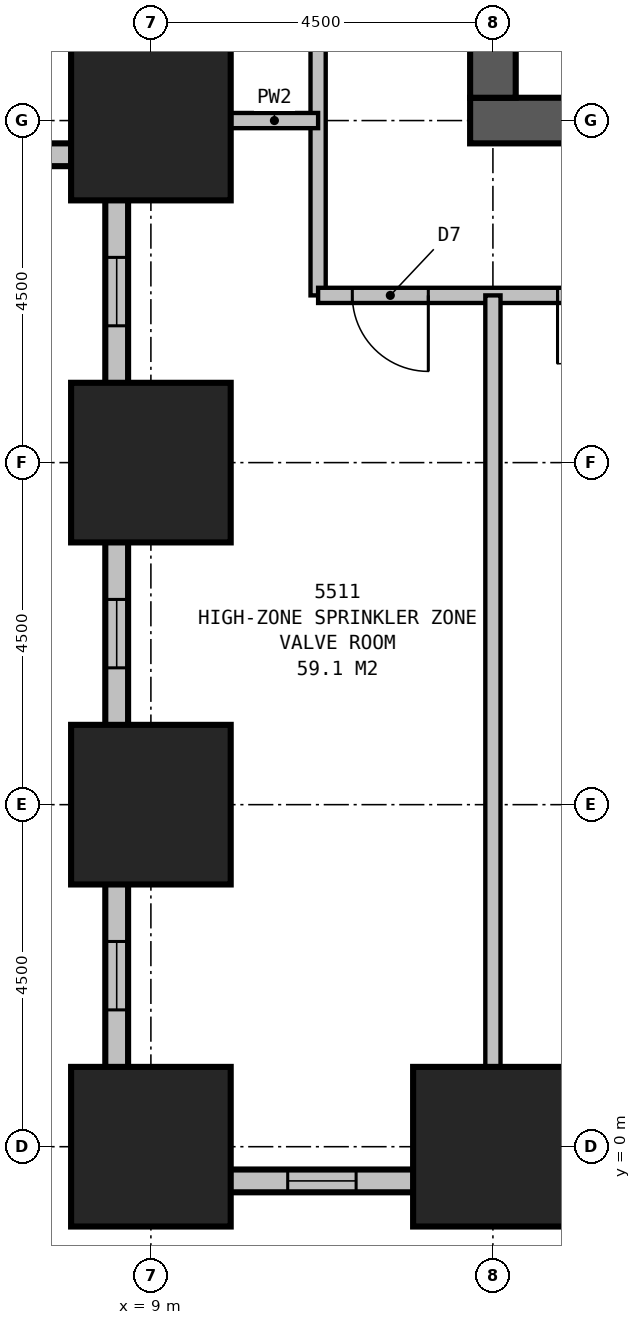
"""IFC4 building model, lengths in metres.
Left out: names, types, materials, properties, quantities, classifications, styles, units other than length and angle.
Written with IfcOpenShell. Run it as: python <this file> out.ifc"""

import sys

from ifc_helpers import new_model, si_unit, direction, frame, frame_2d, origin, origin_2d, place, context, subcontext, project, spatial, rectangle, extrude, element, fill, save


model = new_model("IFC4")
c1 = context("Model", 3, precision=1e-05, world=origin(), true_north=direction((0.0, 1.0)))
c2 = subcontext(c1, "Body", "Model", "MODEL_VIEW")
j1 = project(units=[si_unit("LENGTHUNIT", "METRE"), si_unit("PLANEANGLEUNIT", "RADIAN")], contexts=[c1])
p1 = place(None, origin())
s1 = spatial("IfcSite", under=j1, at=p1, CompositionType="ELEMENT")
p2 = place(p1, origin())
s2 = spatial("IfcBuilding", under=s1, at=p2, CompositionType="ELEMENT")
p3 = place(p2, frame((0.0, 0.0, 211.4)))
s3 = spatial("IfcBuildingStorey", under=s2, at=p3, CompositionType="ELEMENT", Elevation=211.4)
for number, where, z_axis, x_axis in (
    (1, (9.0, 13.5, 0.0), (0.0, 0.0, 1.0), (1.0, 0.0, 0.0)),
    (2, (9.0, 9.0, 0.0), (0.0, 0.0, 1.0), (1.0, 0.0, 0.0)),
    (3, (9.0, 4.5, 0.0), (0.0, 0.0, 1.0), (1.0, 0.0, 0.0)),
    (4, (9.0, 0.0, 0.0), (0.0, 0.0, 1.0), (1.0, 0.0, 0.0)),
    (5, (13.5, 0.0, 0.0), (0.0, 0.0, 1.0), (1.0, 0.0, 0.0)),
):
    element("IfcColumn", number, at=place(p3, frame(where, z_axis=z_axis, x_axis=x_axis)), inside=s3, PredefinedType="COLUMN", context=c2, shape_type="SweptSolid", body=[
        extrude(rectangle(XDim=2.1, YDim=2.1, at=origin_2d()), origin(), (0.0, 0.0, 1.0), 6.0),
    ])
p4 = place(p3, frame((13.2, 13.5, 0.0), z_axis=(0.0, 0.0, 1.0), x_axis=(1.0, 0.0, 0.0)))
e6 = element("IfcWall", 6, at=p4, inside=s3, PredefinedType="SHEAR", context=c2, shape_type="SweptSolid", body=[
    extrude(rectangle(XDim=23.1, YDim=0.6, at=frame_2d((11.55, 0.0))), origin(), (0.0, 0.0, 1.0), 6.0),
])
p5 = place(p3, frame((13.5, 16.5, 0.0), z_axis=(0.0, 0.0, 1.0), x_axis=(0.0, -1.0, 0.0)))
e7 = element("IfcWall", 7, at=p5, inside=s3, PredefinedType="SHEAR", context=c2, shape_type="SweptSolid", body=[
    extrude(rectangle(XDim=2.7, YDim=0.6, at=frame_2d((1.35, 0.0))), origin(), (0.0, 0.0, 1.0), 6.0),
])
p6 = place(p3, frame((0.847, 13.05, 0.0), z_axis=(0.0, 0.0, 1.0), x_axis=(1.0, 0.0, 0.0)))
e8 = element("IfcWall", 8, at=p6, inside=s3, PredefinedType="STANDARD", context=c2, shape_type="SweptSolid", body=[
    extrude(rectangle(XDim=7.853, YDim=0.3, at=frame_2d((3.926, 0.0))), origin(), (0.0, 0.0, 1.0), 2.15),
])
p7 = place(p6, frame((5.453, 0.0, 0.5)))
e9 = element("IfcOpeningElement", 9, at=p7, cuts=e8, PredefinedType="OPENING", context=c2, shape_type="SweptSolid", body=[
    extrude(rectangle(XDim=0.9, YDim=1.2, at=frame_2d((0.45, 0.6))), frame((0.0, 0.16, 0.0), z_axis=(0.0, -1.0, 0.0), x_axis=(1.0, 0.0, 0.0)), (0.0, 0.0, 1.0), 0.32),
])
p8 = place(p3, frame((8.55, 13.2, 0.0), z_axis=(0.0, 0.0, 1.0), x_axis=(0.0, -1.0, 0.0)))
e10 = element("IfcWall", 10, at=p8, inside=s3, PredefinedType="STANDARD", context=c2, shape_type="SweptSolid", body=[
    extrude(rectangle(XDim=13.8, YDim=0.3, at=frame_2d((6.9, 0.0))), origin(), (0.0, 0.0, 1.0), 4.6),
])
p9 = place(p8, frame((1.5, 0.0, 0.5)))
e11 = element("IfcOpeningElement", 11, at=p9, cuts=e10, PredefinedType="OPENING", context=c2, shape_type="SweptSolid", body=[
    extrude(rectangle(XDim=0.9, YDim=1.2, at=frame_2d((0.45, 0.6))), frame((0.0, 0.16, 0.0), z_axis=(0.0, -1.0, 0.0), x_axis=(1.0, 0.0, 0.0)), (0.0, 0.0, 1.0), 0.32),
])
p10 = place(p8, frame((6.0, 0.0, 0.5)))
e12 = element("IfcOpeningElement", 12, at=p10, cuts=e10, PredefinedType="OPENING", context=c2, shape_type="SweptSolid", body=[
    extrude(rectangle(XDim=0.9, YDim=1.2, at=frame_2d((0.45, 0.6))), frame((0.0, 0.16, 0.0), z_axis=(0.0, -1.0, 0.0), x_axis=(1.0, 0.0, 0.0)), (0.0, 0.0, 1.0), 0.32),
])
p11 = place(p8, frame((10.5, 0.0, 0.5)))
e13 = element("IfcOpeningElement", 13, at=p11, cuts=e10, PredefinedType="OPENING", context=c2, shape_type="SweptSolid", body=[
    extrude(rectangle(XDim=0.9, YDim=1.2, at=frame_2d((0.45, 0.6))), frame((0.0, 0.16, 0.0), z_axis=(0.0, -1.0, 0.0), x_axis=(1.0, 0.0, 0.0)), (0.0, 0.0, 1.0), 0.32),
])
p12 = place(p3, frame((8.4, -0.45, 0.0), z_axis=(0.0, 0.0, 1.0), x_axis=(1.0, 0.0, 0.0)))
e14 = element("IfcWall", 14, at=p12, inside=s3, PredefinedType="STANDARD", context=c2, shape_type="SweptSolid", body=[
    extrude(rectangle(XDim=37.2, YDim=0.3, at=frame_2d((18.6, 0.0))), origin(), (0.0, 0.0, 1.0), 4.6),
])
p13 = place(p12, frame((2.4, 0.0, 0.5)))
e15 = element("IfcOpeningElement", 15, at=p13, cuts=e14, PredefinedType="OPENING", context=c2, shape_type="SweptSolid", body=[
    extrude(rectangle(XDim=0.9, YDim=1.2, at=frame_2d((0.45, 0.6))), frame((0.0, 0.16, 0.0), z_axis=(0.0, -1.0, 0.0), x_axis=(1.0, 0.0, 0.0)), (0.0, 0.0, 1.0), 0.32),
])
p14 = place(p12, frame((6.9, 0.0, 0.5)))
e16 = element("IfcOpeningElement", 16, at=p14, cuts=e14, PredefinedType="OPENING", context=c2, shape_type="SweptSolid", body=[
    extrude(rectangle(XDim=0.9, YDim=1.2, at=frame_2d((0.45, 0.6))), frame((0.0, 0.16, 0.0), z_axis=(0.0, -1.0, 0.0), x_axis=(1.0, 0.0, 0.0)), (0.0, 0.0, 1.0), 0.32),
])
p15 = place(p12, frame((11.4, 0.0, 0.5)))
e17 = element("IfcOpeningElement", 17, at=p15, cuts=e14, PredefinedType="OPENING", context=c2, shape_type="SweptSolid", body=[
    extrude(rectangle(XDim=0.9, YDim=1.2, at=frame_2d((0.45, 0.6))), frame((0.0, 0.16, 0.0), z_axis=(0.0, -1.0, 0.0), x_axis=(1.0, 0.0, 0.0)), (0.0, 0.0, 1.0), 0.32),
])
p16 = place(p12, frame((15.9, 0.0, 0.5)))
e18 = element("IfcOpeningElement", 18, at=p16, cuts=e14, PredefinedType="OPENING", context=c2, shape_type="SweptSolid", body=[
    extrude(rectangle(XDim=0.9, YDim=1.2, at=frame_2d((0.45, 0.6))), frame((0.0, 0.16, 0.0), z_axis=(0.0, -1.0, 0.0), x_axis=(1.0, 0.0, 0.0)), (0.0, 0.0, 1.0), 0.32),
])
p17 = place(p12, frame((20.4, 0.0, 0.5)))
e19 = element("IfcOpeningElement", 19, at=p17, cuts=e14, PredefinedType="OPENING", context=c2, shape_type="SweptSolid", body=[
    extrude(rectangle(XDim=0.9, YDim=1.2, at=frame_2d((0.45, 0.6))), frame((0.0, 0.16, 0.0), z_axis=(0.0, -1.0, 0.0), x_axis=(1.0, 0.0, 0.0)), (0.0, 0.0, 1.0), 0.32),
])
p18 = place(p12, frame((24.9, 0.0, 0.5)))
e20 = element("IfcOpeningElement", 20, at=p18, cuts=e14, PredefinedType="OPENING", context=c2, shape_type="SweptSolid", body=[
    extrude(rectangle(XDim=0.9, YDim=1.2, at=frame_2d((0.45, 0.6))), frame((0.0, 0.16, 0.0), z_axis=(0.0, -1.0, 0.0), x_axis=(1.0, 0.0, 0.0)), (0.0, 0.0, 1.0), 0.32),
])
p19 = place(p12, frame((29.4, 0.0, 0.5)))
e21 = element("IfcOpeningElement", 21, at=p19, cuts=e14, PredefinedType="OPENING", context=c2, shape_type="SweptSolid", body=[
    extrude(rectangle(XDim=0.9, YDim=1.2, at=frame_2d((0.45, 0.6))), frame((0.0, 0.16, 0.0), z_axis=(0.0, -1.0, 0.0), x_axis=(1.0, 0.0, 0.0)), (0.0, 0.0, 1.0), 0.32),
])
p20 = place(p12, frame((33.9, 0.0, 0.5)))
e22 = element("IfcOpeningElement", 22, at=p20, cuts=e14, PredefinedType="OPENING", context=c2, shape_type="SweptSolid", body=[
    extrude(rectangle(XDim=0.9, YDim=1.2, at=frame_2d((0.45, 0.6))), frame((0.0, 0.16, 0.0), z_axis=(0.0, -1.0, 0.0), x_axis=(1.0, 0.0, 0.0)), (0.0, 0.0, 1.0), 0.32),
])
p21 = place(p3, frame((11.2, 11.2, 0.0), z_axis=(0.0, 0.0, 1.0), x_axis=(1.0, 0.0, 0.0)))
e23 = element("IfcWall", 23, at=p21, inside=s3, PredefinedType="PARTITIONING", context=c2, shape_type="SweptSolid", body=[
    extrude(rectangle(XDim=27.1, YDim=0.2, at=frame_2d((13.55, 0.0))), origin(), (0.0, 0.0, 1.0), 5.75),
])
p22 = place(p21, frame((4.95, 0.0, 0.0), z_axis=(0.0, 0.0, 1.0), x_axis=(-1.0, 0.0, 0.0)))
e24 = element("IfcOpeningElement", 24, at=p22, cuts=e23, PredefinedType="OPENING", context=c2, shape_type="SweptSolid", body=[
    extrude(rectangle(XDim=1.8, YDim=2.4, at=frame_2d((0.9, 1.2))), frame((0.0, 0.11, 0.0), z_axis=(0.0, -1.0, 0.0), x_axis=(1.0, 0.0, 0.0)), (0.0, 0.0, 1.0), 0.22),
])
p23 = place(p21, frame((17.5, 0.0, 0.0), z_axis=(0.0, 0.0, 1.0), x_axis=(-1.0, 0.0, 0.0)))
e25 = element("IfcOpeningElement", 25, at=p23, cuts=e23, PredefinedType="OPENING", context=c2, shape_type="SweptSolid", body=[
    extrude(rectangle(XDim=1.0, YDim=2.1, at=frame_2d((0.5, 1.05))), frame((0.0, 0.11, 0.0), z_axis=(0.0, -1.0, 0.0), x_axis=(1.0, 0.0, 0.0)), (0.0, 0.0, 1.0), 0.22),
])
p24 = place(p21, frame((19.6, 0.0, 0.0), z_axis=(0.0, 0.0, 1.0), x_axis=(-1.0, 0.0, 0.0)))
e26 = element("IfcOpeningElement", 26, at=p24, cuts=e23, PredefinedType="OPENING", context=c2, shape_type="SweptSolid", body=[
    extrude(rectangle(XDim=1.0, YDim=2.1, at=frame_2d((0.5, 1.05))), frame((0.0, 0.11, 0.0), z_axis=(0.0, -1.0, 0.0), x_axis=(1.0, 0.0, 0.0)), (0.0, 0.0, 1.0), 0.22),
])
p25 = place(p21, frame((21.75, 0.0, 0.0), z_axis=(0.0, 0.0, 1.0), x_axis=(-1.0, 0.0, 0.0)))
e27 = element("IfcOpeningElement", 27, at=p25, cuts=e23, PredefinedType="OPENING", context=c2, shape_type="SweptSolid", body=[
    extrude(rectangle(XDim=1.0, YDim=2.1, at=frame_2d((0.5, 1.05))), frame((0.0, 0.11, 0.0), z_axis=(0.0, -1.0, 0.0), x_axis=(1.0, 0.0, 0.0)), (0.0, 0.0, 1.0), 0.22),
])
p26 = place(p21, frame((1.45, 0.0, 0.0), z_axis=(0.0, 0.0, 1.0), x_axis=(-1.0, 0.0, 0.0)))
e28 = element("IfcOpeningElement", 28, at=p26, cuts=e23, PredefinedType="OPENING", context=c2, shape_type="SweptSolid", body=[
    extrude(rectangle(XDim=1.0, YDim=2.1, at=frame_2d((0.5, 1.05))), frame((0.0, 0.11, 0.0), z_axis=(0.0, -1.0, 0.0), x_axis=(1.0, 0.0, 0.0)), (0.0, 0.0, 1.0), 0.22),
])
p27 = place(p21, frame((26.55, 0.0, 0.0), z_axis=(0.0, 0.0, 1.0), x_axis=(-1.0, 0.0, 0.0)))
e29 = element("IfcOpeningElement", 29, at=p27, cuts=e23, PredefinedType="OPENING", context=c2, shape_type="SweptSolid", body=[
    extrude(rectangle(XDim=1.2, YDim=2.1, at=frame_2d((0.6, 1.05))), frame((0.0, 0.11, 0.0), z_axis=(0.0, -1.0, 0.0), x_axis=(1.0, 0.0, 0.0)), (0.0, 0.0, 1.0), 0.22),
])
p28 = place(p3, frame((11.2, 11.2, 0.0), z_axis=(0.0, 0.0, 1.0), x_axis=(0.0, 1.0, 0.0)))
e30 = element("IfcWall", 30, at=p28, inside=s3, PredefinedType="PARTITIONING", context=c2, shape_type="SweptSolid", body=[
    extrude(rectangle(XDim=18.1, YDim=0.2, at=frame_2d((9.05, 0.0))), origin(), (0.0, 0.0, 1.0), 5.75),
])
p29 = place(p28, frame((3.35, 0.0, 0.0)))
e31 = element("IfcOpeningElement", 31, at=p29, cuts=e30, PredefinedType="OPENING", context=c2, shape_type="SweptSolid", body=[
    extrude(rectangle(XDim=1.0, YDim=2.1, at=frame_2d((0.5, 1.05))), frame((0.0, 0.11, 0.0), z_axis=(0.0, -1.0, 0.0), x_axis=(1.0, 0.0, 0.0)), (0.0, 0.0, 1.0), 0.22),
])
p30 = place(p28, frame((7.25, 0.0, 0.0)))
e32 = element("IfcOpeningElement", 32, at=p30, cuts=e30, PredefinedType="OPENING", context=c2, shape_type="SweptSolid", body=[
    extrude(rectangle(XDim=1.2, YDim=2.1, at=frame_2d((0.6, 1.05))), frame((0.0, 0.11, 0.0), z_axis=(0.0, -1.0, 0.0), x_axis=(1.0, 0.0, 0.0)), (0.0, 0.0, 1.0), 0.22),
])
p31 = place(p3, frame((13.5, 11.2, 0.0), z_axis=(0.0, 0.0, 1.0), x_axis=(0.0, -1.0, 0.0)))
e33 = element("IfcWall", 33, at=p31, inside=s3, PredefinedType="PARTITIONING", context=c2, shape_type="SweptSolid", body=[
    extrude(rectangle(XDim=10.15, YDim=0.2, at=frame_2d((5.075, 0.0))), origin(), (0.0, 0.0, 1.0), 1.85),
])
p32 = place(p3, frame((11.2, 13.5, 0.0), z_axis=(0.0, 0.0, 1.0), x_axis=(-1.0, 0.0, 0.0)))
e34 = element("IfcWall", 34, at=p32, inside=s3, PredefinedType="PARTITIONING", context=c2, shape_type="SweptSolid", body=[
    extrude(rectangle(XDim=1.15, YDim=0.2, at=frame_2d((0.575, 0.0))), origin(), (0.0, 0.0, 1.0), 2.15),
])
p33 = place(p9, origin())
e35 = element("IfcWindow", 35, at=p33, inside=s3, PartitioningType="SINGLE_PANEL", PredefinedType="USERDEFINED", context=c2, shape_type="SweptSolid", body=[
    extrude(rectangle(XDim=0.9, YDim=1.2, at=frame_2d((0.45, 0.6))), frame((0.0, 0.03, 0.0), z_axis=(0.0, -1.0, 0.0), x_axis=(1.0, 0.0, 0.0)), (0.0, 0.0, 1.0), 0.06),
])
fill(e11, e35)
p34 = place(p10, origin())
e36 = element("IfcWindow", 36, at=p34, inside=s3, PartitioningType="SINGLE_PANEL", PredefinedType="USERDEFINED", context=c2, shape_type="SweptSolid", body=[
    extrude(rectangle(XDim=0.9, YDim=1.2, at=frame_2d((0.45, 0.6))), frame((0.0, 0.03, 0.0), z_axis=(0.0, -1.0, 0.0), x_axis=(1.0, 0.0, 0.0)), (0.0, 0.0, 1.0), 0.06),
])
fill(e12, e36)
p35 = place(p11, origin())
e37 = element("IfcWindow", 37, at=p35, inside=s3, PartitioningType="SINGLE_PANEL", PredefinedType="USERDEFINED", context=c2, shape_type="SweptSolid", body=[
    extrude(rectangle(XDim=0.9, YDim=1.2, at=frame_2d((0.45, 0.6))), frame((0.0, 0.03, 0.0), z_axis=(0.0, -1.0, 0.0), x_axis=(1.0, 0.0, 0.0)), (0.0, 0.0, 1.0), 0.06),
])
fill(e13, e37)
p36 = place(p13, origin())
e38 = element("IfcWindow", 38, at=p36, inside=s3, PartitioningType="SINGLE_PANEL", PredefinedType="USERDEFINED", context=c2, shape_type="SweptSolid", body=[
    extrude(rectangle(XDim=0.9, YDim=1.2, at=frame_2d((0.45, 0.6))), frame((0.0, 0.03, 0.0), z_axis=(0.0, -1.0, 0.0), x_axis=(1.0, 0.0, 0.0)), (0.0, 0.0, 1.0), 0.06),
])
fill(e15, e38)
p37 = place(p22, origin())
e39 = element("IfcDoor", 39, at=p37, inside=s3, OperationType="DOUBLE_DOOR_SINGLE_SWING", PredefinedType="DOOR", context=c2, shape_type="SweptSolid", body=[
    extrude(rectangle(XDim=1.8, YDim=2.4, at=frame_2d((0.9, 1.2))), frame((0.0, 0.025, 0.0), z_axis=(0.0, -1.0, 0.0), x_axis=(1.0, 0.0, 0.0)), (0.0, 0.0, 1.0), 0.05),
])
fill(e24, e39)
p38 = place(p26, origin())
e40 = element("IfcDoor", 40, at=p38, inside=s3, OperationType="SINGLE_SWING_LEFT", PredefinedType="DOOR", context=c2, shape_type="SweptSolid", body=[
    extrude(rectangle(XDim=1.0, YDim=2.1, at=frame_2d((0.5, 1.05))), frame((0.0, 0.025, 0.0), z_axis=(0.0, -1.0, 0.0), x_axis=(1.0, 0.0, 0.0)), (0.0, 0.0, 1.0), 0.05),
])
fill(e28, e40)
save(model, sys.argv[1])
